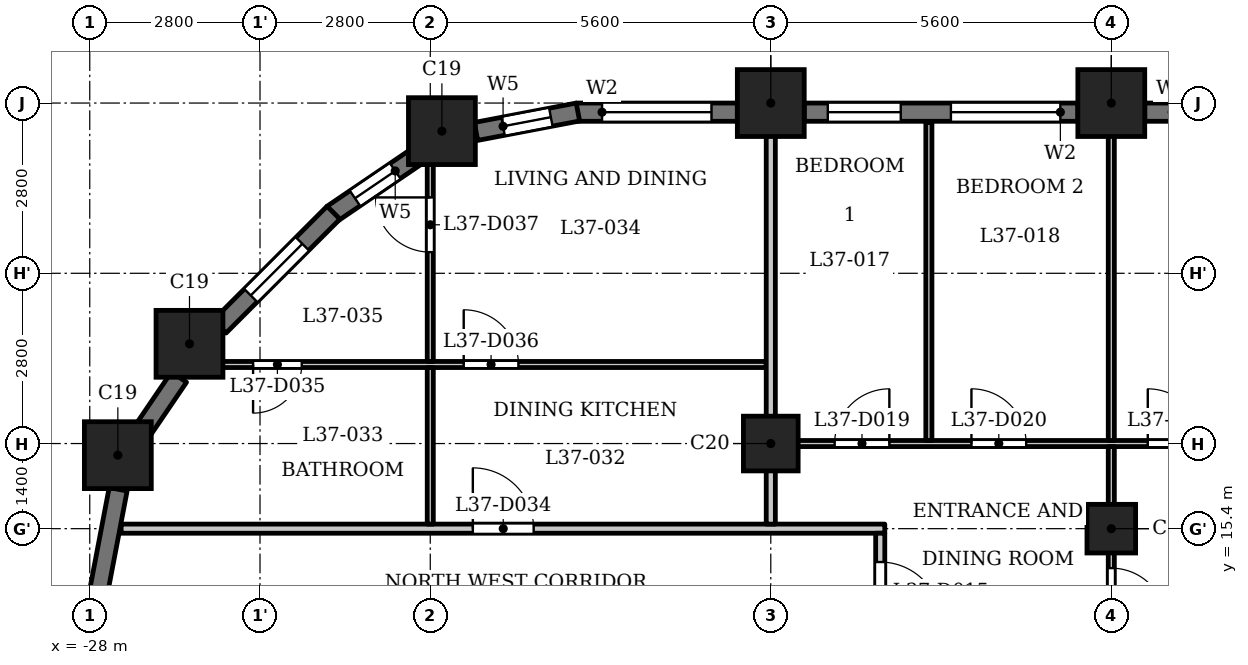
"""IFC4 building model, lengths in metres.
Left out: names, types, materials, properties, quantities, classifications, styles, units other than length and angle.
Written with IfcOpenShell. Run it as: python <this file> out.ifc"""

import sys

from ifc_helpers import new_model, si_unit, direction, frame, frame_2d, origin, origin_2d, place, context, subcontext, project, spatial, rectangle, extrude, element, fill, save


model = new_model("IFC4")
c1 = context("Model", 3, precision=1e-05, world=origin(), true_north=direction((0.0, 1.0)))
c2 = subcontext(c1, "Body", "Model", "MODEL_VIEW")
j1 = project(units=[si_unit("LENGTHUNIT", "METRE"), si_unit("PLANEANGLEUNIT", "RADIAN")], contexts=[c1])
p1 = place(None, origin())
s1 = spatial("IfcSite", under=j1, at=p1, CompositionType="ELEMENT")
p2 = place(p1, origin())
s2 = spatial("IfcBuilding", under=s1, at=p2, CompositionType="ELEMENT")
p3 = place(p2, frame((0.0, 0.0, 146.6)))
s3 = spatial("IfcBuildingStorey", under=s2, at=p3, CompositionType="ELEMENT", Elevation=146.6)
for number, where, z_axis, x_axis in (
    (1, (-11.2, 22.4, 0.0), (0.0, 0.0, 1.0), (1.0, 0.0, 0.0)),
    (2, (-16.8, 22.4, 0.0), (0.0, 0.0, 1.0), (1.0, 0.0, 0.0)),
    (3, (-22.209, 21.938, 0.0), (0.0, 0.0, 1.0), (1.0, 0.0, 0.0)),
    (4, (-26.36, 18.44, 0.0), (0.0, 0.0, 1.0), (1.0, 0.0, 0.0)),
    (5, (-27.538, 16.609, 0.0), (0.0, 0.0, 1.0), (1.0, 0.0, 0.0)),
):
    element("IfcColumn", number, at=place(p3, frame(where, z_axis=z_axis, x_axis=x_axis)), inside=s3, PredefinedType="COLUMN", context=c2, shape_type="SweptSolid", body=[
        extrude(rectangle(XDim=1.1, YDim=1.1, at=origin_2d()), origin(), (0.0, 0.0, 1.0), 3.5),
    ])
p4 = place(p3, frame((-16.8, 16.8, 0.0), z_axis=(0.0, 0.0, 1.0), x_axis=(1.0, 0.0, 0.0)))
e6 = element("IfcColumn", 6, at=p4, inside=s3, PredefinedType="COLUMN", context=c2, shape_type="SweptSolid", body=[
    extrude(rectangle(XDim=0.9, YDim=0.9, at=origin_2d()), origin(), (0.0, 0.0, 1.0), 3.5),
])
p5 = place(p3, frame((-11.2, 15.4, 0.0), z_axis=(0.0, 0.0, 1.0), x_axis=(1.0, 0.0, 0.0)))
e7 = element("IfcColumn", 7, at=p5, inside=s3, PredefinedType="COLUMN", context=c2, shape_type="SweptSolid", body=[
    extrude(rectangle(XDim=0.8, YDim=0.8, at=origin_2d()), origin(), (0.0, 0.0, 1.0), 3.5),
])
p6 = place(p3, frame((-6.15, 22.25, 0.0), z_axis=(0.0, 0.0, 1.0), x_axis=(-1.0, 0.0, 0.0)))
e8 = element("IfcWall", 8, at=p6, inside=s3, PredefinedType="SOLIDWALL", context=c2, shape_type="SweptSolid", body=[
    extrude(rectangle(XDim=4.5, YDim=0.3, at=frame_2d((2.25, 0.0))), origin(), (0.0, 0.0, 1.0), 2.45),
])
p7 = place(p6, frame((0.45, 0.0, 1.2)))
e9 = element("IfcOpeningElement", 9, at=p7, cuts=e8, PredefinedType="OPENING", context=c2, shape_type="SweptSolid", body=[
    extrude(rectangle(XDim=3.6, YDim=0.95, at=frame_2d((1.8, 0.475))), frame((0.0, 0.16, 0.0), z_axis=(0.0, -1.0, 0.0), x_axis=(1.0, 0.0, 0.0)), (0.0, 0.0, 1.0), 0.32),
])
p8 = place(p3, frame((-11.75, 22.25, 0.0), z_axis=(0.0, 0.0, 1.0), x_axis=(-1.0, 0.0, 0.0)))
e10 = element("IfcWall", 10, at=p8, inside=s3, PredefinedType="SOLIDWALL", context=c2, shape_type="SweptSolid", body=[
    extrude(rectangle(XDim=4.5, YDim=0.3, at=frame_2d((2.25, 0.0))), origin(), (0.0, 0.0, 1.0), 2.45),
])
p9 = place(p8, frame((0.288, 0.0, 0.9)))
e11 = element("IfcOpeningElement", 11, at=p9, cuts=e10, PredefinedType="OPENING", context=c2, shape_type="SweptSolid", body=[
    extrude(rectangle(XDim=1.8, YDim=1.25, at=frame_2d((0.9, 0.625))), frame((0.0, 0.16, 0.0), z_axis=(0.0, -1.0, 0.0), x_axis=(1.0, 0.0, 0.0)), (0.0, 0.0, 1.0), 0.32),
])
p10 = place(p8, frame((2.913, 0.0, 0.6)))
e12 = element("IfcOpeningElement", 12, at=p10, cuts=e10, PredefinedType="OPENING", context=c2, shape_type="SweptSolid", body=[
    extrude(rectangle(XDim=1.2, YDim=1.55, at=frame_2d((0.6, 0.775))), frame((0.0, 0.16, 0.0), z_axis=(0.0, -1.0, 0.0), x_axis=(1.0, 0.0, 0.0)), (0.0, 0.0, 1.0), 0.32),
])
p11 = place(p3, frame((-17.35, 22.25, 0.0), z_axis=(0.0, 0.0, 1.0), x_axis=(-1.0, 0.0, 0.0)))
e13 = element("IfcWall", 13, at=p11, inside=s3, PredefinedType="SOLIDWALL", context=c2, shape_type="SweptSolid", body=[
    extrude(rectangle(XDim=2.65, YDim=0.3, at=frame_2d((1.325, 0.0))), origin(), (0.0, 0.0, 1.0), 2.45),
])
p12 = place(p11, frame((0.425, 0.0, 0.9)))
e14 = element("IfcOpeningElement", 14, at=p12, cuts=e13, PredefinedType="OPENING", context=c2, shape_type="SweptSolid", body=[
    extrude(rectangle(XDim=1.8, YDim=1.25, at=frame_2d((0.9, 0.625))), frame((0.0, 0.16, 0.0), z_axis=(0.0, -1.0, 0.0), x_axis=(1.0, 0.0, 0.0)), (0.0, 0.0, 1.0), 0.32),
])
p13 = place(p3, frame((-19.972, 22.253, 0.0), z_axis=(0.0, 0.0, 1.0), x_axis=(-0.982297206936, -0.187329114784, 0.0)))
e15 = element("IfcWall", 15, at=p13, inside=s3, PredefinedType="SOLIDWALL", context=c2, shape_type="SweptSolid", body=[
    extrude(rectangle(XDim=1.706, YDim=0.3, at=frame_2d((0.853, 0.0))), origin(), (0.0, 0.0, 1.0), 2.45),
])
p14 = place(p13, frame((0.453, 0.0, 0.6)))
e16 = element("IfcOpeningElement", 16, at=p14, cuts=e15, PredefinedType="OPENING", context=c2, shape_type="SweptSolid", body=[
    extrude(rectangle(XDim=0.8, YDim=1.55, at=frame_2d((0.4, 0.775))), frame((0.0, 0.16, 0.0), z_axis=(0.0, -1.0, 0.0), x_axis=(1.0, 0.0, 0.0)), (0.0, 0.0, 1.0), 0.32),
])
p15 = place(p3, frame((-22.602, 21.538, 0.0), z_axis=(0.0, 0.0, 1.0), x_axis=(-0.827040942766, -0.562141689424, 0.0)))
e17 = element("IfcWall", 17, at=p15, inside=s3, PredefinedType="SOLIDWALL", context=c2, shape_type="SweptSolid", body=[
    extrude(rectangle(XDim=1.706, YDim=0.3, at=frame_2d((0.853, 0.0))), origin(), (0.0, 0.0, 1.0), 2.45),
])
p16 = place(p15, frame((0.453, 0.0, 0.6)))
e18 = element("IfcOpeningElement", 18, at=p16, cuts=e17, PredefinedType="OPENING", context=c2, shape_type="SweptSolid", body=[
    extrude(rectangle(XDim=0.8, YDim=1.55, at=frame_2d((0.4, 0.775))), frame((0.0, 0.16, 0.0), z_axis=(0.0, -1.0, 0.0), x_axis=(1.0, 0.0, 0.0)), (0.0, 0.0, 1.0), 0.32),
])
p17 = place(p3, frame((-23.991, 20.597, 0.0), z_axis=(0.0, 0.0, 1.0), x_axis=(-0.707106781187, -0.707106781187, 0.0)))
e19 = element("IfcWall", 19, at=p17, inside=s3, PredefinedType="SOLIDWALL", context=c2, shape_type="SweptSolid", body=[
    extrude(rectangle(XDim=2.65, YDim=0.3, at=frame_2d((1.325, 0.0))), origin(), (0.0, 0.0, 1.0), 2.45),
])
p18 = place(p17, frame((0.725, 0.0, 0.6)))
e20 = element("IfcOpeningElement", 20, at=p18, cuts=e19, PredefinedType="OPENING", context=c2, shape_type="SweptSolid", body=[
    extrude(rectangle(XDim=1.2, YDim=1.55, at=frame_2d((0.6, 0.775))), frame((0.0, 0.16, 0.0), z_axis=(0.0, -1.0, 0.0), x_axis=(1.0, 0.0, 0.0)), (0.0, 0.0, 1.0), 0.32),
])
p19 = place(p3, frame((-26.532, 17.893, 0.0), z_axis=(0.0, 0.0, 1.0), x_axis=(-0.562105419172, -0.82706559458, 0.0)))
e21 = element("IfcWall", 21, at=p19, inside=s3, PredefinedType="SOLIDWALL", context=c2, shape_type="SweptSolid", body=[
    extrude(rectangle(XDim=1.077, YDim=0.3, at=frame_2d((0.539, 0.0))), origin(), (0.0, 0.0, 1.0), 3.2),
])
p20 = place(p3, frame((-27.533, 16.048, 0.0), z_axis=(0.0, 0.0, 1.0), x_axis=(-0.187302784601, -0.982302227871, 0.0)))
e22 = element("IfcWall", 22, at=p20, inside=s3, PredefinedType="SOLIDWALL", context=c2, shape_type="SweptSolid", body=[
    extrude(rectangle(XDim=1.706, YDim=0.3, at=frame_2d((0.853, 0.0))), origin(), (0.0, 0.0, 1.0), 2.45),
])
p21 = place(p3, frame((-27.484, 15.4, 0.0), z_axis=(0.0, 0.0, 1.0), x_axis=(1.0, 0.0, 0.0)))
e23 = element("IfcWall", 23, at=p21, inside=s3, PredefinedType="PARTITIONING", context=c2, shape_type="SweptSolid", body=[
    extrude(rectangle(XDim=12.559, YDim=0.15, at=frame_2d((6.279, 0.0))), origin(), (0.0, 0.0, 1.0), 3.2),
])
p22 = place(p21, frame((5.784, 0.0, 0.0)))
e24 = element("IfcOpeningElement", 24, at=p22, cuts=e23, PredefinedType="OPENING", context=c2, shape_type="SweptSolid", body=[
    extrude(rectangle(XDim=1.0, YDim=2.1, at=frame_2d((0.5, 1.05))), frame((0.0, 0.085, 0.0), z_axis=(0.0, -1.0, 0.0), x_axis=(1.0, 0.0, 0.0)), (0.0, 0.0, 1.0), 0.17),
])
p23 = place(p3, frame((-16.725, 16.8, 0.0), z_axis=(0.0, 0.0, 1.0), x_axis=(1.0, 0.0, 0.0)))
e25 = element("IfcWall", 25, at=p23, inside=s3, PredefinedType="PARTITIONING", context=c2, shape_type="SweptSolid", body=[
    extrude(rectangle(XDim=33.45, YDim=0.1, at=frame_2d((16.725, 0.0))), origin(), (0.0, 0.0, 1.0), 3.2),
])
p24 = place(p23, frame((9.575, 0.0, 0.0)))
e26 = element("IfcOpeningElement", 26, at=p24, cuts=e25, PredefinedType="OPENING", context=c2, shape_type="SweptSolid", body=[
    extrude(rectangle(XDim=0.8, YDim=2.1, at=frame_2d((0.4, 1.05))), frame((0.0, 0.06, 0.0), z_axis=(0.0, -1.0, 0.0), x_axis=(1.0, 0.0, 0.0)), (0.0, 0.0, 1.0), 0.12),
])
p25 = place(p23, frame((6.125, 0.0, 0.0)))
e27 = element("IfcOpeningElement", 27, at=p25, cuts=e25, PredefinedType="OPENING", context=c2, shape_type="SweptSolid", body=[
    extrude(rectangle(XDim=0.9, YDim=2.1, at=frame_2d((0.45, 1.05))), frame((0.0, 0.06, 0.0), z_axis=(0.0, -1.0, 0.0), x_axis=(1.0, 0.0, 0.0)), (0.0, 0.0, 1.0), 0.12),
])
p26 = place(p23, frame((0.975, 0.0, 0.0)))
e28 = element("IfcOpeningElement", 28, at=p26, cuts=e25, PredefinedType="OPENING", context=c2, shape_type="SweptSolid", body=[
    extrude(rectangle(XDim=0.9, YDim=2.1, at=frame_2d((0.45, 1.05))), frame((0.0, 0.06, 0.0), z_axis=(0.0, -1.0, 0.0), x_axis=(1.0, 0.0, 0.0)), (0.0, 0.0, 1.0), 0.12),
])
p27 = place(p23, frame((3.225, 0.0, 0.0)))
e29 = element("IfcOpeningElement", 29, at=p27, cuts=e25, PredefinedType="OPENING", context=c2, shape_type="SweptSolid", body=[
    extrude(rectangle(XDim=0.9, YDim=2.1, at=frame_2d((0.45, 1.05))), frame((0.0, 0.06, 0.0), z_axis=(0.0, -1.0, 0.0), x_axis=(1.0, 0.0, 0.0)), (0.0, 0.0, 1.0), 0.12),
])
p28 = place(p23, frame((15.375, 0.0, 0.0)))
e30 = element("IfcOpeningElement", 30, at=p28, cuts=e25, PredefinedType="OPENING", context=c2, shape_type="SweptSolid", body=[
    extrude(rectangle(XDim=0.8, YDim=2.1, at=frame_2d((0.4, 1.05))), frame((0.0, 0.06, 0.0), z_axis=(0.0, -1.0, 0.0), x_axis=(1.0, 0.0, 0.0)), (0.0, 0.0, 1.0), 0.12),
])
p29 = place(p23, frame((13.175, 0.0, 0.0)))
e31 = element("IfcOpeningElement", 31, at=p29, cuts=e25, PredefinedType="OPENING", context=c2, shape_type="SweptSolid", body=[
    extrude(rectangle(XDim=0.9, YDim=2.1, at=frame_2d((0.45, 1.05))), frame((0.0, 0.06, 0.0), z_axis=(0.0, -1.0, 0.0), x_axis=(1.0, 0.0, 0.0)), (0.0, 0.0, 1.0), 0.12),
])
p30 = place(p23, frame((31.975, 0.0, 0.0)))
e32 = element("IfcOpeningElement", 32, at=p30, cuts=e25, PredefinedType="OPENING", context=c2, shape_type="SweptSolid", body=[
    extrude(rectangle(XDim=0.9, YDim=2.1, at=frame_2d((0.45, 1.05))), frame((0.0, 0.06, 0.0), z_axis=(0.0, -1.0, 0.0), x_axis=(1.0, 0.0, 0.0)), (0.0, 0.0, 1.0), 0.12),
])
p31 = place(p23, frame((22.875, 0.0, 0.0)))
e33 = element("IfcOpeningElement", 33, at=p31, cuts=e25, PredefinedType="OPENING", context=c2, shape_type="SweptSolid", body=[
    extrude(rectangle(XDim=0.9, YDim=2.1, at=frame_2d((0.45, 1.05))), frame((0.0, 0.06, 0.0), z_axis=(0.0, -1.0, 0.0), x_axis=(1.0, 0.0, 0.0)), (0.0, 0.0, 1.0), 0.12),
])
p32 = place(p3, frame((-26.44, 18.1, 0.0), z_axis=(0.0, 0.0, 1.0), x_axis=(1.0, 0.0, 0.0)))
e34 = element("IfcWall", 34, at=p32, inside=s3, PredefinedType="PARTITIONING", context=c2, shape_type="SweptSolid", body=[
    extrude(rectangle(XDim=9.565, YDim=0.1, at=frame_2d((4.782, 0.0))), origin(), (0.0, 0.0, 1.0), 3.2),
])
p33 = place(p32, frame((1.126, 0.0, 0.0)))
e35 = element("IfcOpeningElement", 35, at=p33, cuts=e34, PredefinedType="OPENING", context=c2, shape_type="SweptSolid", body=[
    extrude(rectangle(XDim=0.8, YDim=2.1, at=frame_2d((0.4, 1.05))), frame((0.0, 0.06, 0.0), z_axis=(0.0, -1.0, 0.0), x_axis=(1.0, 0.0, 0.0)), (0.0, 0.0, 1.0), 0.12),
])
p34 = place(p32, frame((4.59, 0.0, 0.0)))
e36 = element("IfcOpeningElement", 36, at=p34, cuts=e34, PredefinedType="OPENING", context=c2, shape_type="SweptSolid", body=[
    extrude(rectangle(XDim=0.9, YDim=2.1, at=frame_2d((0.45, 1.05))), frame((0.0, 0.06, 0.0), z_axis=(0.0, -1.0, 0.0), x_axis=(1.0, 0.0, 0.0)), (0.0, 0.0, 1.0), 0.12),
])
p35 = place(p3, frame((-22.4, 15.475, 0.0), z_axis=(0.0, 0.0, 1.0), x_axis=(0.0, 1.0, 0.0)))
e37 = element("IfcWall", 37, at=p35, inside=s3, PredefinedType="PARTITIONING", context=c2, shape_type="SweptSolid", body=[
    extrude(rectangle(XDim=2.575, YDim=0.1, at=frame_2d((1.288, 0.0))), origin(), (0.0, 0.0, 1.0), 3.2),
])
p36 = place(p3, frame((-22.4, 18.15, 0.0), z_axis=(0.0, 0.0, 1.0), x_axis=(0.0, 1.0, 0.0)))
e38 = element("IfcWall", 38, at=p36, inside=s3, PredefinedType="PARTITIONING", context=c2, shape_type="SweptSolid", body=[
    extrude(rectangle(XDim=3.57, YDim=0.1, at=frame_2d((1.785, 0.0))), origin(), (0.0, 0.0, 1.0), 3.2),
])
p37 = place(p36, frame((1.798, 0.0, 0.0)))
e39 = element("IfcOpeningElement", 39, at=p37, cuts=e38, PredefinedType="OPENING", context=c2, shape_type="SweptSolid", body=[
    extrude(rectangle(XDim=0.9, YDim=2.1, at=frame_2d((0.45, 1.05))), frame((0.0, 0.06, 0.0), z_axis=(0.0, -1.0, 0.0), x_axis=(1.0, 0.0, 0.0)), (0.0, 0.0, 1.0), 0.12),
])
p38 = place(p3, frame((-16.8, 15.475, 0.0), z_axis=(0.0, 0.0, 1.0), x_axis=(0.0, 1.0, 0.0)))
e40 = element("IfcWall", 40, at=p38, inside=s3, PredefinedType="PARTITIONING", context=c2, shape_type="SweptSolid", body=[
    extrude(rectangle(XDim=7.455, YDim=0.15, at=frame_2d((3.728, 0.0))), origin(), (0.0, 0.0, 1.0), 3.2),
])
p39 = place(p3, frame((-15.0, 13.275, 0.0), z_axis=(0.0, 0.0, 1.0), x_axis=(0.0, 1.0, 0.0)))
e41 = element("IfcWall", 41, at=p39, inside=s3, PredefinedType="PARTITIONING", context=c2, shape_type="SweptSolid", body=[
    extrude(rectangle(XDim=2.05, YDim=0.15, at=frame_2d((1.025, 0.0))), origin(), (0.0, 0.0, 1.0), 3.2),
])
p40 = place(p39, frame((0.576, 0.0, 0.0)))
e42 = element("IfcOpeningElement", 42, at=p40, cuts=e41, PredefinedType="OPENING", context=c2, shape_type="SweptSolid", body=[
    extrude(rectangle(XDim=1.0, YDim=2.1, at=frame_2d((0.5, 1.05))), frame((0.0, 0.085, 0.0), z_axis=(0.0, -1.0, 0.0), x_axis=(1.0, 0.0, 0.0)), (0.0, 0.0, 1.0), 0.17),
])
p41 = place(p3, frame((-14.2, 16.85, 0.0), z_axis=(0.0, 0.0, 1.0), x_axis=(0.0, 1.0, 0.0)))
e43 = element("IfcWall", 43, at=p41, inside=s3, PredefinedType="PARTITIONING", context=c2, shape_type="SweptSolid", body=[
    extrude(rectangle(XDim=5.23, YDim=0.1, at=frame_2d((2.615, 0.0))), origin(), (0.0, 0.0, 1.0), 3.2),
])
p42 = place(p3, frame((-11.2, 13.275, 0.0), z_axis=(0.0, 0.0, 1.0), x_axis=(0.0, 1.0, 0.0)))
e44 = element("IfcWall", 44, at=p42, inside=s3, PredefinedType="PARTITIONING", context=c2, shape_type="SweptSolid", body=[
    extrude(rectangle(XDim=3.475, YDim=0.1, at=frame_2d((1.738, 0.0))), origin(), (0.0, 0.0, 1.0), 3.2),
])
p43 = place(p42, frame((0.576, 0.0, 0.0)))
e45 = element("IfcOpeningElement", 45, at=p43, cuts=e44, PredefinedType="OPENING", context=c2, shape_type="SweptSolid", body=[
    extrude(rectangle(XDim=0.9, YDim=2.1, at=frame_2d((0.45, 1.05))), frame((0.0, 0.06, 0.0), z_axis=(0.0, -1.0, 0.0), x_axis=(1.0, 0.0, 0.0)), (0.0, 0.0, 1.0), 0.12),
])
p44 = place(p3, frame((-11.2, 16.85, 0.0), z_axis=(0.0, 0.0, 1.0), x_axis=(0.0, 1.0, 0.0)))
e46 = element("IfcWall", 46, at=p44, inside=s3, PredefinedType="PARTITIONING", context=c2, shape_type="SweptSolid", body=[
    extrude(rectangle(XDim=6.08, YDim=0.1, at=frame_2d((3.04, 0.0))), origin(), (0.0, 0.0, 1.0), 3.2),
])
p45 = place(p40, origin())
e47 = element("IfcDoor", 47, at=p45, inside=s3, OperationType="SINGLE_SWING_LEFT", PredefinedType="DOOR", context=c2, shape_type="SweptSolid", body=[
    extrude(rectangle(XDim=1.0, YDim=2.1, at=frame_2d((0.5, 1.05))), frame((0.0, 0.025, 0.0), z_axis=(0.0, -1.0, 0.0), x_axis=(1.0, 0.0, 0.0)), (0.0, 0.0, 1.0), 0.05),
])
fill(e42, e47)
p46 = place(p43, origin())
e48 = element("IfcDoor", 48, at=p46, inside=s3, OperationType="SINGLE_SWING_LEFT", PredefinedType="DOOR", context=c2, shape_type="SweptSolid", body=[
    extrude(rectangle(XDim=0.9, YDim=2.1, at=frame_2d((0.45, 1.05))), frame((0.0, 0.025, 0.0), z_axis=(0.0, -1.0, 0.0), x_axis=(1.0, 0.0, 0.0)), (0.0, 0.0, 1.0), 0.05),
])
fill(e45, e48)
p47 = place(p25, origin())
e49 = element("IfcDoor", 49, at=p47, inside=s3, OperationType="SINGLE_SWING_RIGHT", PredefinedType="DOOR", context=c2, shape_type="SweptSolid", body=[
    extrude(rectangle(XDim=0.9, YDim=2.1, at=frame_2d((0.45, 1.05))), frame((0.0, 0.025, 0.0), z_axis=(0.0, -1.0, 0.0), x_axis=(1.0, 0.0, 0.0)), (0.0, 0.0, 1.0), 0.05),
])
fill(e27, e49)
p48 = place(p26, origin())
e50 = element("IfcDoor", 50, at=p48, inside=s3, OperationType="SINGLE_SWING_LEFT", PredefinedType="DOOR", context=c2, shape_type="SweptSolid", body=[
    extrude(rectangle(XDim=0.9, YDim=2.1, at=frame_2d((0.45, 1.05))), frame((0.0, 0.025, 0.0), z_axis=(0.0, -1.0, 0.0), x_axis=(1.0, 0.0, 0.0)), (0.0, 0.0, 1.0), 0.05),
])
fill(e28, e50)
p49 = place(p27, origin())
e51 = element("IfcDoor", 51, at=p49, inside=s3, OperationType="SINGLE_SWING_RIGHT", PredefinedType="DOOR", context=c2, shape_type="SweptSolid", body=[
    extrude(rectangle(XDim=0.9, YDim=2.1, at=frame_2d((0.45, 1.05))), frame((0.0, 0.025, 0.0), z_axis=(0.0, -1.0, 0.0), x_axis=(1.0, 0.0, 0.0)), (0.0, 0.0, 1.0), 0.05),
])
fill(e29, e51)
p50 = place(p22, origin())
e52 = element("IfcDoor", 52, at=p50, inside=s3, OperationType="SINGLE_SWING_RIGHT", PredefinedType="DOOR", context=c2, shape_type="SweptSolid", body=[
    extrude(rectangle(XDim=1.0, YDim=2.1, at=frame_2d((0.5, 1.05))), frame((0.0, 0.025, 0.0), z_axis=(0.0, -1.0, 0.0), x_axis=(1.0, 0.0, 0.0)), (0.0, 0.0, 1.0), 0.05),
])
fill(e24, e52)
p51 = place(p33, origin())
e53 = element("IfcDoor", 53, at=p51, inside=s3, OperationType="SINGLE_SWING_LEFT", PredefinedType="DOOR", context=c2, shape_type="SweptSolid", body=[
    extrude(rectangle(XDim=0.8, YDim=2.1, at=frame_2d((0.4, 1.05))), frame((0.0, 0.025, 0.0), z_axis=(0.0, -1.0, 0.0), x_axis=(1.0, 0.0, 0.0)), (0.0, 0.0, 1.0), 0.05),
])
fill(e35, e53)
p52 = place(p34, origin())
e54 = element("IfcDoor", 54, at=p52, inside=s3, OperationType="SINGLE_SWING_RIGHT", PredefinedType="DOOR", context=c2, shape_type="SweptSolid", body=[
    extrude(rectangle(XDim=0.9, YDim=2.1, at=frame_2d((0.45, 1.05))), frame((0.0, 0.025, 0.0), z_axis=(0.0, -1.0, 0.0), x_axis=(1.0, 0.0, 0.0)), (0.0, 0.0, 1.0), 0.05),
])
fill(e36, e54)
p53 = place(p37, origin())
e55 = element("IfcDoor", 55, at=p53, inside=s3, OperationType="SINGLE_SWING_LEFT", PredefinedType="DOOR", context=c2, shape_type="SweptSolid", body=[
    extrude(rectangle(XDim=0.9, YDim=2.1, at=frame_2d((0.45, 1.05))), frame((0.0, 0.025, 0.0), z_axis=(0.0, -1.0, 0.0), x_axis=(1.0, 0.0, 0.0)), (0.0, 0.0, 1.0), 0.05),
])
fill(e39, e55)
p54 = place(p9, origin())
e56 = element("IfcWindow", 56, at=p54, inside=s3, PartitioningType="SINGLE_PANEL", PredefinedType="WINDOW", context=c2, shape_type="SweptSolid", body=[
    extrude(rectangle(XDim=1.8, YDim=1.25, at=frame_2d((0.9, 0.625))), frame((0.0, 0.03, 0.0), z_axis=(0.0, -1.0, 0.0), x_axis=(1.0, 0.0, 0.0)), (0.0, 0.0, 1.0), 0.06),
])
fill(e11, e56)
p55 = place(p10, origin())
e57 = element("IfcWindow", 57, at=p55, inside=s3, PartitioningType="SINGLE_PANEL", PredefinedType="WINDOW", context=c2, shape_type="SweptSolid", body=[
    extrude(rectangle(XDim=1.2, YDim=1.55, at=frame_2d((0.6, 0.775))), frame((0.0, 0.03, 0.0), z_axis=(0.0, -1.0, 0.0), x_axis=(1.0, 0.0, 0.0)), (0.0, 0.0, 1.0), 0.06),
])
fill(e12, e57)
p56 = place(p12, origin())
e58 = element("IfcWindow", 58, at=p56, inside=s3, PartitioningType="SINGLE_PANEL", PredefinedType="WINDOW", context=c2, shape_type="SweptSolid", body=[
    extrude(rectangle(XDim=1.8, YDim=1.25, at=frame_2d((0.9, 0.625))), frame((0.0, 0.03, 0.0), z_axis=(0.0, -1.0, 0.0), x_axis=(1.0, 0.0, 0.0)), (0.0, 0.0, 1.0), 0.06),
])
fill(e14, e58)
p57 = place(p14, origin())
e59 = element("IfcWindow", 59, at=p57, inside=s3, PartitioningType="SINGLE_PANEL", PredefinedType="WINDOW", context=c2, shape_type="SweptSolid", body=[
    extrude(rectangle(XDim=0.8, YDim=1.55, at=frame_2d((0.4, 0.775))), frame((0.0, 0.03, 0.0), z_axis=(0.0, -1.0, 0.0), x_axis=(1.0, 0.0, 0.0)), (0.0, 0.0, 1.0), 0.06),
])
fill(e16, e59)
p58 = place(p16, origin())
e60 = element("IfcWindow", 60, at=p58, inside=s3, PartitioningType="SINGLE_PANEL", PredefinedType="WINDOW", context=c2, shape_type="SweptSolid", body=[
    extrude(rectangle(XDim=0.8, YDim=1.55, at=frame_2d((0.4, 0.775))), frame((0.0, 0.03, 0.0), z_axis=(0.0, -1.0, 0.0), x_axis=(1.0, 0.0, 0.0)), (0.0, 0.0, 1.0), 0.06),
])
fill(e18, e60)
p59 = place(p18, origin())
e61 = element("IfcWindow", 61, at=p59, inside=s3, PartitioningType="SINGLE_PANEL", PredefinedType="WINDOW", context=c2, shape_type="SweptSolid", body=[
    extrude(rectangle(XDim=1.2, YDim=1.55, at=frame_2d((0.6, 0.775))), frame((0.0, 0.03, 0.0), z_axis=(0.0, -1.0, 0.0), x_axis=(1.0, 0.0, 0.0)), (0.0, 0.0, 1.0), 0.06),
])
fill(e20, e61)
save(model, sys.argv[1])
